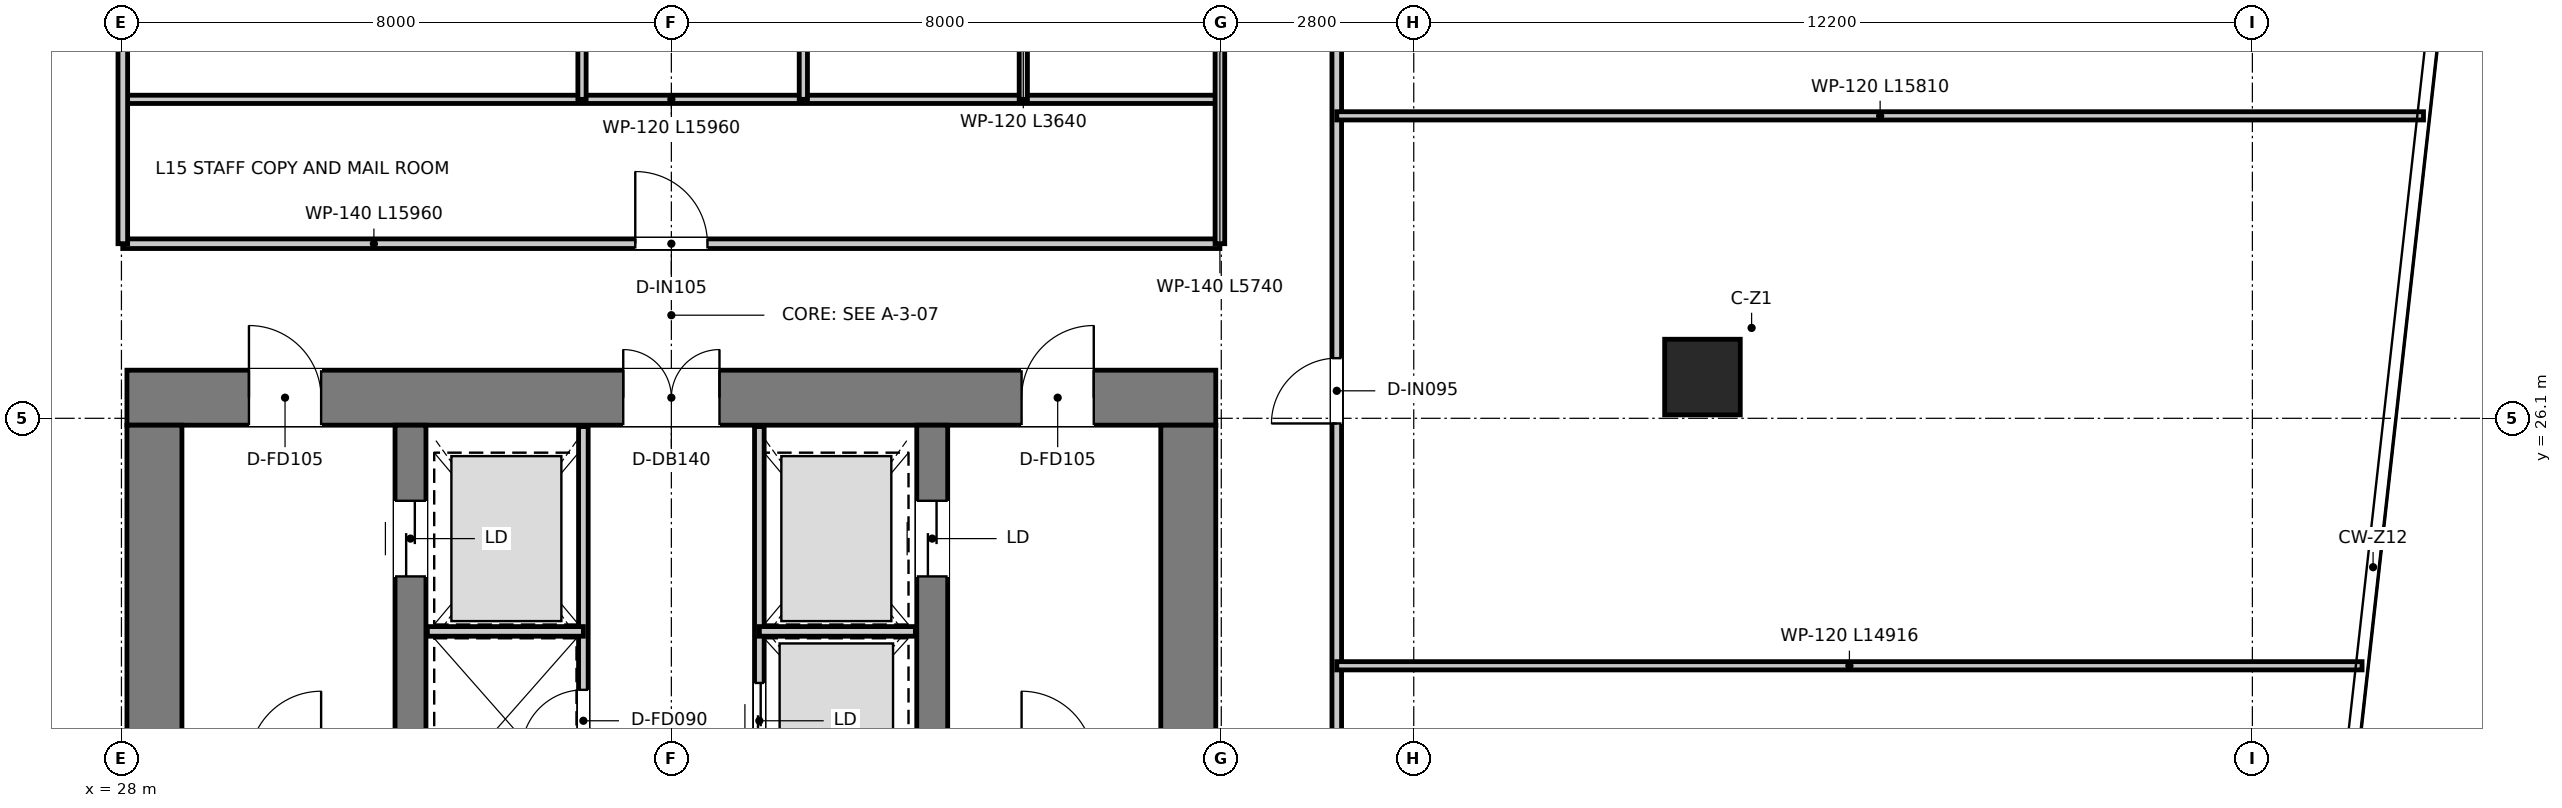
"""IFC4 building model, lengths in metres.
Left out: names, types, materials, properties, quantities, classifications, styles, units other than length and angle.
Written with IfcOpenShell. Run it as: python <this file> out.ifc"""

import sys

from ifc_helpers import new_model, si_unit, direction, frame, frame_2d, origin, origin_2d, place, context, subcontext, project, spatial, rectangle, extrude, source, transform, mapped, element, fill, save


model = new_model("IFC4")
c1 = context("Model", 3, precision=1e-05, world=origin(), true_north=direction((0.0, 1.0)))
c2 = subcontext(c1, "Body", "Model", "MODEL_VIEW")
j1 = project(units=[si_unit("LENGTHUNIT", "METRE"), si_unit("PLANEANGLEUNIT", "RADIAN")], contexts=[c1])
p1 = place(None, origin())
s1 = spatial("IfcSite", under=j1, at=p1, CompositionType="ELEMENT")
p2 = place(p1, origin())
s2 = spatial("IfcBuilding", under=s1, at=p2, CompositionType="ELEMENT")
p3 = place(p2, frame((0.0, 0.0, 64.5)))
s3 = spatial("IfcBuildingStorey", under=s2, at=p3, CompositionType="ELEMENT", Elevation=64.5)
p4 = place(p3, frame((28.08, 26.4, 0.0), z_axis=(0.0, 0.0, 1.0), x_axis=(1.0, 0.0, 0.0)))
e1 = element("IfcWall", 1, at=p4, inside=s3, PredefinedType="SHEAR", context=c2, shape_type="SweptSolid", body=[
    extrude(rectangle(XDim=15.84, YDim=0.8, at=frame_2d((7.92, 0.0))), origin(), (0.0, 0.0, 1.0), 3.95),
])
p5 = place(p4, frame((7.22, 0.0, 0.0)))
e2 = element("IfcOpeningElement", 2, at=p5, cuts=e1, PredefinedType="OPENING", context=c2, shape_type="SweptSolid", body=[
    extrude(rectangle(XDim=1.4, YDim=2.2, at=frame_2d((0.7, 1.1))), frame((0.0, 0.41, 0.0), z_axis=(0.0, -1.0, 0.0), x_axis=(1.0, 0.0, 0.0)), (0.0, 0.0, 1.0), 0.82),
])
p6 = place(p4, frame((1.775, 0.0, 0.0)))
e3 = element("IfcOpeningElement", 3, at=p6, cuts=e1, PredefinedType="OPENING", context=c2, shape_type="SweptSolid", body=[
    extrude(rectangle(XDim=1.05, YDim=2.1, at=frame_2d((0.525, 1.05))), frame((0.0, 0.41, 0.0), z_axis=(0.0, -1.0, 0.0), x_axis=(1.0, 0.0, 0.0)), (0.0, 0.0, 1.0), 0.82),
])
p7 = place(p4, frame((13.015, 0.0, 0.0)))
e4 = element("IfcOpeningElement", 4, at=p7, cuts=e1, PredefinedType="OPENING", context=c2, shape_type="SweptSolid", body=[
    extrude(rectangle(XDim=1.05, YDim=2.1, at=frame_2d((0.525, 1.05))), frame((0.0, 0.41, 0.0), z_axis=(0.0, -1.0, 0.0), x_axis=(1.0, 0.0, 0.0)), (0.0, 0.0, 1.0), 0.82),
])
for number, where, z_axis, x_axis in (
    (5, (28.48, 11.3, 0.0), (0.0, 0.0, 1.0), (0.0, 1.0, 0.0)),
    (6, (43.52, 11.3, 0.0), (0.0, 0.0, 1.0), (0.0, 1.0, 0.0)),
):
    element("IfcWall", number, at=place(p3, frame(where, z_axis=z_axis, x_axis=x_axis)), inside=s3, PredefinedType="SHEAR", context=c2, shape_type="SweptSolid", body=[
        extrude(rectangle(XDim=14.7, YDim=0.8, at=frame_2d((7.35, 0.0))), origin(), (0.0, 0.0, 1.0), 3.95),
    ])
p8 = place(p3, frame((32.205, 13.22, 0.0), z_axis=(0.0, 0.0, 1.0), x_axis=(0.0, 1.0, 0.0)))
e7 = element("IfcWall", 7, at=p8, inside=s3, PredefinedType="SHEAR", context=c2, shape_type="SweptSolid", body=[
    extrude(rectangle(XDim=12.78, YDim=0.45, at=frame_2d((6.39, 0.0))), origin(), (0.0, 0.0, 1.0), 3.95),
])
p9 = place(p8, frame((10.58, 0.0, 0.0)))
e8 = element("IfcOpeningElement", 8, at=p9, cuts=e7, PredefinedType="OPENING", context=c2, shape_type="SweptSolid", body=[
    extrude(rectangle(XDim=1.1, YDim=2.15, at=frame_2d((0.55, 1.075))), frame((0.0, 0.235, 0.0), z_axis=(0.0, -1.0, 0.0), x_axis=(1.0, 0.0, 0.0)), (0.0, 0.0, 1.0), 0.47),
])
p10 = place(p3, frame((39.795, 13.22, 0.0), z_axis=(0.0, 0.0, 1.0), x_axis=(0.0, 1.0, 0.0)))
e9 = element("IfcWall", 9, at=p10, inside=s3, PredefinedType="SHEAR", context=c2, shape_type="SweptSolid", body=[
    extrude(rectangle(XDim=12.78, YDim=0.45, at=frame_2d((6.39, 0.0))), origin(), (0.0, 0.0, 1.0), 3.95),
])
p11 = place(p10, frame((10.58, 0.0, 0.0)))
e10 = element("IfcOpeningElement", 10, at=p11, cuts=e9, PredefinedType="OPENING", context=c2, shape_type="SweptSolid", body=[
    extrude(rectangle(XDim=1.1, YDim=2.15, at=frame_2d((0.55, 1.075))), frame((0.0, 0.235, 0.0), z_axis=(0.0, -1.0, 0.0), x_axis=(1.0, 0.0, 0.0)), (0.0, 0.0, 1.0), 0.47),
])
m1 = source(origin(), c2, "Body", "SweptSolid", [
    extrude(rectangle(XDim=1.1, YDim=1.1, at=origin_2d()), origin(), (0.0, 0.0, 1.0), 3.95),
])
p12 = place(p3, frame((51.0, 26.7, 0.0), z_axis=(0.0, 0.0, 1.0), x_axis=(1.0, 0.0, 0.0)))
e11 = element("IfcColumn", 11, at=p12, inside=s3, PredefinedType="COLUMN", context=c2, shape_type="MappedRepresentation", body=[
    mapped(m1, transform((0.0, 0.0, 0.0), x_axis=(1.0, 0.0, 0.0), y_axis=(0.0, 1.0, 0.0), z_axis=(0.0, 0.0, 1.0), scale=1.0)),
])
p13 = place(p3, frame((34.72, 20.2, 0.0), z_axis=(0.0, 0.0, 1.0), x_axis=(0.0, 1.0, 0.0)))
e12 = element("IfcWall", 12, at=p13, inside=s3, PredefinedType="PARTITIONING", context=c2, shape_type="SweptSolid", body=[
    extrude(rectangle(XDim=5.78, YDim=0.14, at=frame_2d((2.89, 0.0))), origin(), (0.0, 0.0, 1.0), 2.47),
])
p14 = place(p13, frame((1.05, 0.0, 0.0)))
e13 = element("IfcOpeningElement", 13, at=p14, cuts=e12, PredefinedType="OPENING", context=c2, shape_type="SweptSolid", body=[
    extrude(rectangle(XDim=0.9, YDim=2.1, at=frame_2d((0.45, 1.05))), frame((0.0, 0.08, 0.0), z_axis=(0.0, -1.0, 0.0), x_axis=(1.0, 0.0, 0.0)), (0.0, 0.0, 1.0), 0.16),
])
p15 = place(p3, frame((37.28, 20.2, 0.0), z_axis=(0.0, 0.0, 1.0), x_axis=(0.0, 1.0, 0.0)))
e14 = element("IfcWall", 14, at=p15, inside=s3, PredefinedType="PARTITIONING", context=c2, shape_type="SweptSolid", body=[
    extrude(rectangle(XDim=5.78, YDim=0.14, at=frame_2d((2.89, 0.0))), origin(), (0.0, 0.0, 1.0), 2.47),
])
p16 = place(p15, frame((0.95, 0.0, 0.0)))
e15 = element("IfcOpeningElement", 15, at=p16, cuts=e14, PredefinedType="OPENING", context=c2, shape_type="SweptSolid", body=[
    extrude(rectangle(XDim=1.1, YDim=2.15, at=frame_2d((0.55, 1.075))), frame((0.0, 0.08, 0.0), z_axis=(0.0, -1.0, 0.0), x_axis=(1.0, 0.0, 0.0)), (0.0, 0.0, 1.0), 0.16),
])
for number, where, z_axis, x_axis in (
    (16, (32.45, 23.0, 0.0), (0.0, 0.0, 1.0), (1.0, 0.0, 0.0)),
    (17, (37.28, 23.0, 0.0), (0.0, 0.0, 1.0), (1.0, 0.0, 0.0)),
):
    element("IfcWall", number, at=place(p3, frame(where, z_axis=z_axis, x_axis=x_axis)), inside=s3, PredefinedType="PARTITIONING", context=c2, shape_type="SweptSolid", body=[
        extrude(rectangle(XDim=2.27, YDim=0.14, at=frame_2d((1.135, 0.0))), origin(), (0.0, 0.0, 1.0), 2.47),
    ])
p17 = place(p3, frame((28.02, 28.64, 0.0), z_axis=(0.0, 0.0, 1.0), x_axis=(1.0, 0.0, 0.0)))
e18 = element("IfcWall", 18, at=p17, inside=s3, PredefinedType="PARTITIONING", context=c2, shape_type="SweptSolid", body=[
    extrude(rectangle(XDim=15.96, YDim=0.14, at=frame_2d((7.98, 0.0))), origin(), (0.0, 0.0, 1.0), 3.08),
])
p18 = place(p17, frame((7.455, 0.0, 0.0)))
e19 = element("IfcOpeningElement", 19, at=p18, cuts=e18, PredefinedType="OPENING", context=c2, shape_type="SweptSolid", body=[
    extrude(rectangle(XDim=1.05, YDim=2.15, at=frame_2d((0.525, 1.075))), frame((0.0, 0.08, 0.0), z_axis=(0.0, -1.0, 0.0), x_axis=(1.0, 0.0, 0.0)), (0.0, 0.0, 1.0), 0.16),
])
p19 = place(p3, frame((28.02, 30.74, 0.0), z_axis=(0.0, 0.0, 1.0), x_axis=(1.0, 0.0, 0.0)))
e20 = element("IfcWall", 20, at=p19, inside=s3, PredefinedType="PARTITIONING", context=c2, shape_type="SweptSolid", body=[
    extrude(rectangle(XDim=15.96, YDim=0.12, at=frame_2d((7.98, 0.0))), origin(), (0.0, 0.0, 1.0), 3.08),
])
for number, where, z_axis, x_axis in (
    (21, (28.02, 28.64, 0.0), (0.0, 0.0, 1.0), (0.0, 1.0, 0.0)),
    (22, (43.98, 28.64, 0.0), (0.0, 0.0, 1.0), (0.0, 1.0, 0.0)),
):
    element("IfcWall", number, at=place(p3, frame(where, z_axis=z_axis, x_axis=x_axis)), inside=s3, PredefinedType="PARTITIONING", context=c2, shape_type="SweptSolid", body=[
        extrude(rectangle(XDim=5.74, YDim=0.14, at=frame_2d((2.87, 0.0))), origin(), (0.0, 0.0, 1.0), 3.22),
    ])
for number, where, z_axis, x_axis in (
    (23, (37.92, 30.74, 0.0), (0.0, 0.0, 1.0), (0.0, 1.0, 0.0)),
    (24, (41.12, 30.74, 0.0), (0.0, 0.0, 1.0), (0.0, 1.0, 0.0)),
    (25, (34.7, 30.74, 0.0), (0.0, 0.0, 1.0), (0.0, 1.0, 0.0)),
):
    element("IfcWall", number, at=place(p3, frame(where, z_axis=z_axis, x_axis=x_axis)), inside=s3, PredefinedType="PARTITIONING", context=c2, shape_type="SweptSolid", body=[
        extrude(rectangle(XDim=3.64, YDim=0.12, at=frame_2d((1.82, 0.0))), origin(), (0.0, 0.0, 1.0), 3.12),
    ])
p20 = place(p3, frame((45.68, 10.5, 0.0), z_axis=(0.0, 0.0, 1.0), x_axis=(0.0, 1.0, 0.0)))
e26 = element("IfcWall", 26, at=p20, inside=s3, PredefinedType="PARTITIONING", context=c2, shape_type="SweptSolid", body=[
    extrude(rectangle(XDim=25.62, YDim=0.14, at=frame_2d((12.81, 0.0))), origin(), (0.0, 0.0, 1.0), 2.97),
])
p21 = place(p20, frame((9.025, 0.0, 0.0)))
e27 = element("IfcOpeningElement", 27, at=p21, cuts=e26, PredefinedType="OPENING", context=c2, shape_type="SweptSolid", body=[
    extrude(rectangle(XDim=0.95, YDim=2.1, at=frame_2d((0.475, 1.05))), frame((0.0, 0.08, 0.0), z_axis=(0.0, -1.0, 0.0), x_axis=(1.0, 0.0, 0.0)), (0.0, 0.0, 1.0), 0.16),
])
p22 = place(p20, frame((15.525, 0.0, 0.0)))
e28 = element("IfcOpeningElement", 28, at=p22, cuts=e26, PredefinedType="OPENING", context=c2, shape_type="SweptSolid", body=[
    extrude(rectangle(XDim=0.95, YDim=2.1, at=frame_2d((0.475, 1.05))), frame((0.0, 0.08, 0.0), z_axis=(0.0, -1.0, 0.0), x_axis=(1.0, 0.0, 0.0)), (0.0, 0.0, 1.0), 0.16),
])
p23 = place(p20, frame((21.625, 0.0, 0.0)))
e29 = element("IfcOpeningElement", 29, at=p23, cuts=e26, PredefinedType="OPENING", context=c2, shape_type="SweptSolid", body=[
    extrude(rectangle(XDim=0.95, YDim=2.1, at=frame_2d((0.475, 1.05))), frame((0.0, 0.08, 0.0), z_axis=(0.0, -1.0, 0.0), x_axis=(1.0, 0.0, 0.0)), (0.0, 0.0, 1.0), 0.16),
])
p24 = place(p3, frame((45.68, 22.5, 0.0), z_axis=(0.0, 0.0, 1.0), x_axis=(1.0, 0.0, 0.0)))
e30 = element("IfcWall", 30, at=p24, inside=s3, PredefinedType="PARTITIONING", context=c2, shape_type="SweptSolid", body=[
    extrude(rectangle(XDim=14.916, YDim=0.12, at=frame_2d((7.458, 0.0))), origin(), (0.0, 0.0, 1.0), 2.97),
])
p25 = place(p3, frame((45.68, 30.5, 0.0), z_axis=(0.0, 0.0, 1.0), x_axis=(1.0, 0.0, 0.0)))
e31 = element("IfcWall", 31, at=p25, inside=s3, PredefinedType="PARTITIONING", context=c2, shape_type="SweptSolid", body=[
    extrude(rectangle(XDim=15.81, YDim=0.12, at=frame_2d((7.905, 0.0))), origin(), (0.0, 0.0, 1.0), 2.97),
])
p26 = place(p5, origin())
e32 = element("IfcDoor", 32, at=p26, inside=s3, OperationType="DOUBLE_DOOR_SINGLE_SWING", PredefinedType="DOOR", context=c2, shape_type="SweptSolid", body=[
    extrude(rectangle(XDim=1.4, YDim=2.2, at=frame_2d((0.7, 1.1))), frame((0.0, 0.025, 0.0), z_axis=(0.0, -1.0, 0.0), x_axis=(1.0, 0.0, 0.0)), (0.0, 0.0, 1.0), 0.05),
])
fill(e2, e32)
p27 = place(p6, origin())
e33 = element("IfcDoor", 33, at=p27, inside=s3, OperationType="SINGLE_SWING_LEFT", PredefinedType="DOOR", context=c2, shape_type="SweptSolid", body=[
    extrude(rectangle(XDim=1.05, YDim=2.1, at=frame_2d((0.525, 1.05))), frame((0.0, 0.025, 0.0), z_axis=(0.0, -1.0, 0.0), x_axis=(1.0, 0.0, 0.0)), (0.0, 0.0, 1.0), 0.05),
])
fill(e3, e33)
p28 = place(p7, origin())
e34 = element("IfcDoor", 34, at=p28, inside=s3, OperationType="SINGLE_SWING_RIGHT", PredefinedType="DOOR", context=c2, shape_type="SweptSolid", body=[
    extrude(rectangle(XDim=1.05, YDim=2.1, at=frame_2d((0.525, 1.05))), frame((0.0, 0.025, 0.0), z_axis=(0.0, -1.0, 0.0), x_axis=(1.0, 0.0, 0.0)), (0.0, 0.0, 1.0), 0.05),
])
fill(e4, e34)
p29 = place(p9, origin())
e35 = element("IfcDoor", 35, at=p29, inside=s3, OperationType="DOUBLE_DOOR_SLIDING", PredefinedType="DOOR", context=c2, shape_type="SweptSolid", body=[
    extrude(rectangle(XDim=1.1, YDim=2.15, at=frame_2d((0.55, 1.075))), frame((0.0, 0.025, 0.0), z_axis=(0.0, -1.0, 0.0), x_axis=(1.0, 0.0, 0.0)), (0.0, 0.0, 1.0), 0.05),
])
fill(e8, e35)
p30 = place(p11, origin())
e36 = element("IfcDoor", 36, at=p30, inside=s3, OperationType="DOUBLE_DOOR_SLIDING", PredefinedType="DOOR", context=c2, shape_type="SweptSolid", body=[
    extrude(rectangle(XDim=1.1, YDim=2.15, at=frame_2d((0.55, 1.075))), frame((0.0, 0.025, 0.0), z_axis=(0.0, -1.0, 0.0), x_axis=(1.0, 0.0, 0.0)), (0.0, 0.0, 1.0), 0.05),
])
fill(e10, e36)
p31 = place(p14, origin())
e37 = element("IfcDoor", 37, at=p31, inside=s3, OperationType="SINGLE_SWING_LEFT", PredefinedType="DOOR", context=c2, shape_type="SweptSolid", body=[
    extrude(rectangle(XDim=0.9, YDim=2.1, at=frame_2d((0.45, 1.05))), frame((0.0, 0.025, 0.0), z_axis=(0.0, -1.0, 0.0), x_axis=(1.0, 0.0, 0.0)), (0.0, 0.0, 1.0), 0.05),
])
fill(e13, e37)
p32 = place(p16, origin())
e38 = element("IfcDoor", 38, at=p32, inside=s3, OperationType="DOUBLE_DOOR_SLIDING", PredefinedType="DOOR", context=c2, shape_type="SweptSolid", body=[
    extrude(rectangle(XDim=1.1, YDim=2.15, at=frame_2d((0.55, 1.075))), frame((0.0, 0.025, 0.0), z_axis=(0.0, -1.0, 0.0), x_axis=(1.0, 0.0, 0.0)), (0.0, 0.0, 1.0), 0.05),
])
fill(e15, e38)
p33 = place(p18, origin())
e39 = element("IfcDoor", 39, at=p33, inside=s3, OperationType="SINGLE_SWING_LEFT", PredefinedType="DOOR", context=c2, shape_type="SweptSolid", body=[
    extrude(rectangle(XDim=1.05, YDim=2.15, at=frame_2d((0.525, 1.075))), frame((0.0, 0.025, 0.0), z_axis=(0.0, -1.0, 0.0), x_axis=(1.0, 0.0, 0.0)), (0.0, 0.0, 1.0), 0.05),
])
fill(e19, e39)
p34 = place(p22, origin())
e40 = element("IfcDoor", 40, at=p34, inside=s3, OperationType="SINGLE_SWING_LEFT", PredefinedType="DOOR", context=c2, shape_type="SweptSolid", body=[
    extrude(rectangle(XDim=0.95, YDim=2.1, at=frame_2d((0.475, 1.05))), frame((0.0, 0.025, 0.0), z_axis=(0.0, -1.0, 0.0), x_axis=(1.0, 0.0, 0.0)), (0.0, 0.0, 1.0), 0.05),
])
fill(e28, e40)
save(model, sys.argv[1])
